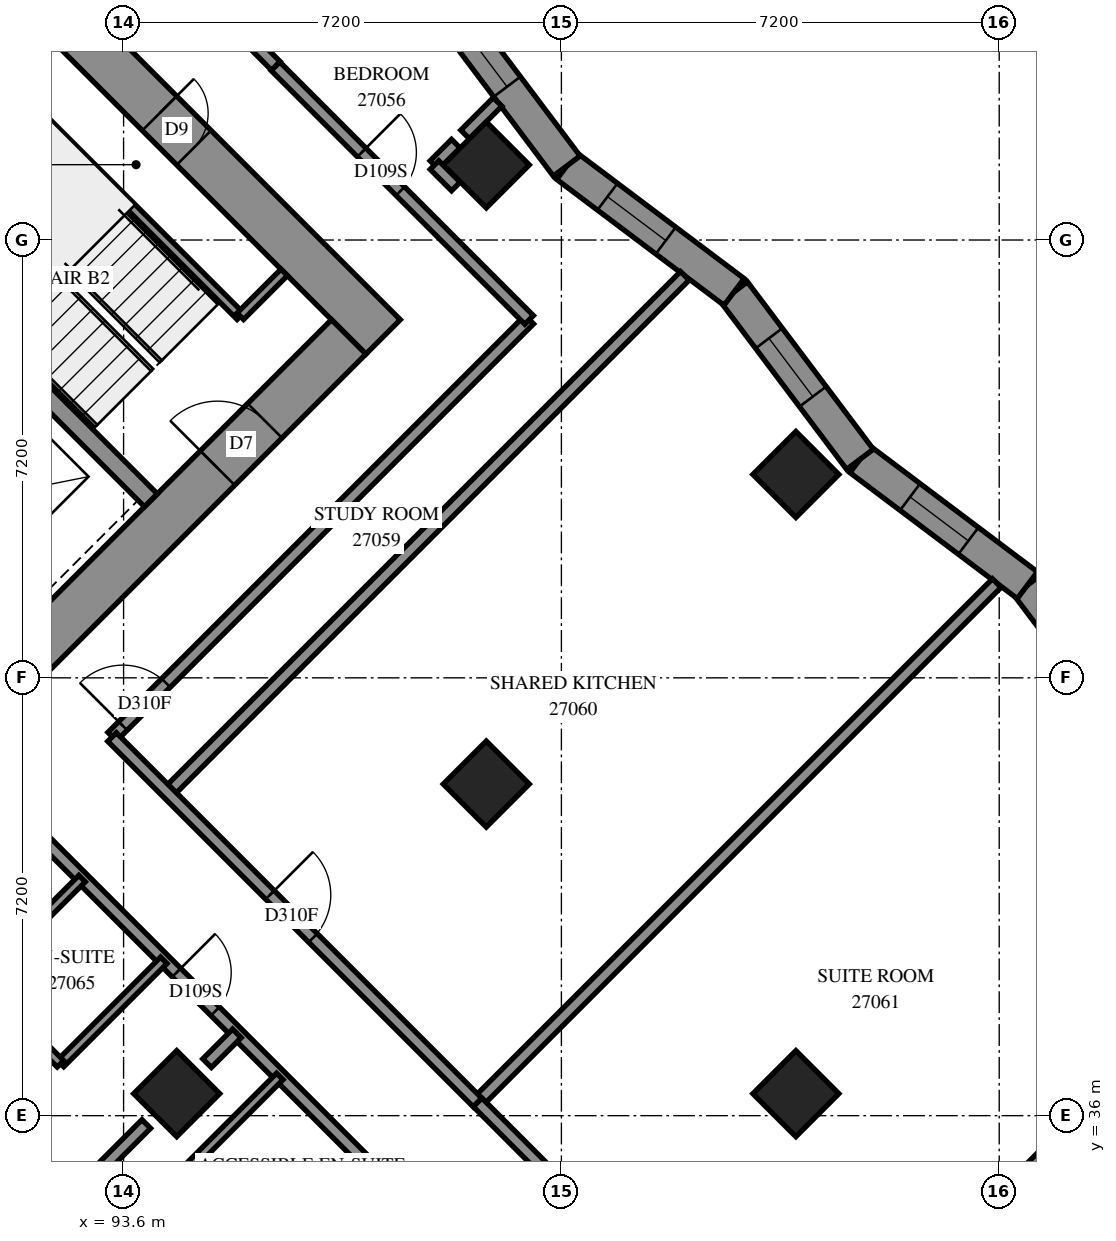
"""IFC4 building model, lengths in metres.
Left out: names, types, materials, properties, quantities, classifications, styles, units other than length and angle.
Written with IfcOpenShell. Run it as: python <this file> out.ifc"""

import sys

from ifc_helpers import new_model, si_unit, direction, frame, frame_2d, origin, origin_2d, place, context, subcontext, project, spatial, polyline, rectangle, outline, extrude, element, fill, save


model = new_model("IFC4")
c1 = context("Model", 3, precision=1e-05, world=origin(), true_north=direction((0.0, 1.0)))
c2 = subcontext(c1, "Body", "Model", "MODEL_VIEW")
j1 = project(units=[si_unit("LENGTHUNIT", "METRE"), si_unit("PLANEANGLEUNIT", "RADIAN")], contexts=[c1])
p1 = place(None, origin())
s1 = spatial("IfcSite", under=j1, at=p1, CompositionType="ELEMENT")
p2 = place(p1, origin())
s2 = spatial("IfcBuilding", under=s1, at=p2, CompositionType="ELEMENT")
p3 = place(p2, frame((0.0, 0.0, 101.6)))
s3 = spatial("IfcBuildingStorey", under=s2, at=p3, CompositionType="ELEMENT", Elevation=101.6)
for number, where, z_axis, x_axis in (
    (1, (99.565, 51.635, 0.0), (0.0, 0.0, 1.0), (0.707, -0.707, 0.0)),
    (2, (104.656, 46.544, 0.0), (0.0, 0.0, 1.0), (0.707, -0.707, 0.0)),
    (3, (99.565, 41.453, 0.0), (0.0, 0.0, 1.0), (0.707, -0.707, 0.0)),
    (4, (94.474, 36.362, 0.0), (0.0, 0.0, 1.0), (0.707, -0.707, 0.0)),
    (5, (104.656, 36.362, 0.0), (0.0, 0.0, 1.0), (0.707, -0.707, 0.0)),
):
    element("IfcColumn", number, at=place(p3, frame(where, z_axis=z_axis, x_axis=x_axis)), inside=s3, PredefinedType="COLUMN", context=c2, shape_type="SweptSolid", body=[
        extrude(rectangle(XDim=1.0, YDim=1.0, at=origin_2d()), origin(), (0.0, 0.0, 1.0), 3.1),
    ])
p4 = place(p3, frame((86.554, 60.121, -0.3), z_axis=(0.0, 0.0, 1.0), x_axis=(0.7071067812, -0.7071067812, 0.0)))
e6 = element("IfcWall", 6, at=p4, inside=s3, PredefinedType="SHEAR", context=c2, shape_type="SweptSolid", body=[
    extrude(rectangle(XDim=16.0, YDim=0.8, at=frame_2d((8.0, 0.0))), origin(), (0.0, 0.0, 1.0), 2.7),
])
p5 = place(p4, frame((10.8, 0.0, 0.3)))
e7 = element("IfcOpeningElement", 7, at=p5, cuts=e6, PredefinedType="OPENING", context=c2, shape_type="SweptSolid", body=[
    extrude(rectangle(XDim=0.8, YDim=2.1, at=frame_2d((0.4, 1.05))), frame((0.0, 0.41, 0.0), z_axis=(0.0, -1.0, 0.0), x_axis=(1.0, 0.0, 0.0)), (0.0, 0.0, 1.0), 0.82),
])
p6 = place(p3, frame((87.12, 38.625, -0.3), z_axis=(0.0, 0.0, 1.0), x_axis=(0.7071067812, 0.7071067812, 0.0)))
e8 = element("IfcWall", 8, at=p6, inside=s3, PredefinedType="SHEAR", context=c2, shape_type="SweptSolid", body=[
    extrude(rectangle(XDim=14.4, YDim=0.8, at=frame_2d((7.2, 0.0))), origin(), (0.0, 0.0, 1.0), 2.7),
])
p7 = place(p6, frame((4.55, 0.0, 0.3)))
e9 = element("IfcOpeningElement", 9, at=p7, cuts=e8, PredefinedType="OPENING", context=c2, shape_type="SweptSolid", body=[
    extrude(rectangle(XDim=1.1, YDim=2.1, at=frame_2d((0.55, 1.05))), frame((0.0, 0.41, 0.0), z_axis=(0.0, -1.0, 0.0), x_axis=(1.0, 0.0, 0.0)), (0.0, 0.0, 1.0), 0.82),
])
p8 = place(p6, frame((11.35, 0.0, 0.3)))
e10 = element("IfcOpeningElement", 10, at=p8, cuts=e8, PredefinedType="OPENING", context=c2, shape_type="SweptSolid", body=[
    extrude(rectangle(XDim=1.1, YDim=2.1, at=frame_2d((0.55, 1.05))), frame((0.0, 0.41, 0.0), z_axis=(0.0, -1.0, 0.0), x_axis=(1.0, 0.0, 0.0)), (0.0, 0.0, 1.0), 0.82),
])
p9 = place(p3, frame((88.958, 51.211, 0.0), z_axis=(0.0, 0.0, 1.0), x_axis=(0.7070998367, -0.7071137256, 0.0)))
e11 = element("IfcWall", 11, at=p9, inside=s3, PredefinedType="SOLIDWALL", context=c2, shape_type="SweptSolid", body=[
    extrude(rectangle(XDim=7.2, YDim=0.3, at=frame_2d((3.6, 0.0))), origin(), (0.0, 0.0, 1.0), 3.1),
])
p10 = place(p3, frame((110.547, 41.952, 0.0), z_axis=(0.0, 0.0, 1.0), x_axis=(-0.6011988974, 0.7990994217, 0.0)))
e12 = element("IfcWall", 12, at=p10, inside=s3, PredefinedType="SOLIDWALL", context=c2, shape_type="SweptSolid", body=[
    extrude(outline(polyline([(0.063, -0.275), (3.507, -0.275), (3.429, 0.275), (-0.063, 0.275), (0.063, -0.275)])), origin(), (0.0, 0.0, 1.0), 3.1),
])
p11 = place(p10, frame((1.115, 0.0, 0.5)))
e13 = element("IfcOpeningElement", 13, at=p11, cuts=e12, PredefinedType="OPENING", context=c2, shape_type="SweptSolid", body=[
    extrude(rectangle(XDim=1.2, YDim=2.45, at=frame_2d((0.6, 1.225))), frame((0.0, 0.285, 0.0), z_axis=(0.0, -1.0, 0.0), x_axis=(1.0, 0.0, 0.0)), (0.0, 0.0, 1.0), 0.57),
])
p12 = place(p3, frame((108.463, 44.723, 0.0), z_axis=(0.0, 0.0, 1.0), x_axis=(-0.7991072191, 0.6011885331, 0.0)))
e14 = element("IfcWall", 14, at=p12, inside=s3, PredefinedType="SOLIDWALL", context=c2, shape_type="SweptSolid", body=[
    extrude(outline(polyline([(-0.039, -0.275), (3.405, -0.275), (3.483, 0.275), (0.039, 0.275), (-0.039, -0.275)])), origin(), (0.0, 0.0, 1.0), 3.1),
])
p13 = place(p12, frame((1.214, 0.0, 0.5)))
e15 = element("IfcOpeningElement", 15, at=p13, cuts=e14, PredefinedType="OPENING", context=c2, shape_type="SweptSolid", body=[
    extrude(rectangle(XDim=1.2, YDim=2.45, at=frame_2d((0.6, 1.225))), frame((0.0, 0.285, 0.0), z_axis=(0.0, -1.0, 0.0), x_axis=(1.0, 0.0, 0.0)), (0.0, 0.0, 1.0), 0.57),
])
p14 = place(p3, frame((105.71, 46.794, 0.0), z_axis=(0.0, 0.0, 1.0), x_axis=(-0.6011839411, 0.7991106738, 0.0)))
e16 = element("IfcWall", 16, at=p14, inside=s3, PredefinedType="SOLIDWALL", context=c2, shape_type="SweptSolid", body=[
    extrude(outline(polyline([(0.039, -0.275), (3.483, -0.275), (3.405, 0.275), (-0.039, 0.275), (0.039, -0.275)])), origin(), (0.0, 0.0, 1.0), 3.1),
])
p15 = place(p14, frame((1.29, 0.0, 0.5)))
e17 = element("IfcOpeningElement", 17, at=p15, cuts=e16, PredefinedType="OPENING", context=c2, shape_type="SweptSolid", body=[
    extrude(rectangle(XDim=1.2, YDim=2.45, at=frame_2d((0.6, 1.225))), frame((0.0, 0.285, 0.0), z_axis=(0.0, -1.0, 0.0), x_axis=(1.0, 0.0, 0.0)), (0.0, 0.0, 1.0), 0.57),
])
p16 = place(p3, frame((103.64, 49.546, 0.0), z_axis=(0.0, 0.0, 1.0), x_axis=(-0.7991072191, 0.6011885331, 0.0)))
e18 = element("IfcWall", 18, at=p16, inside=s3, PredefinedType="SOLIDWALL", context=c2, shape_type="SweptSolid", body=[
    extrude(outline(polyline([(-0.039, -0.275), (3.405, -0.275), (3.483, 0.275), (0.039, 0.275), (-0.039, -0.275)])), origin(), (0.0, 0.0, 1.0), 3.1),
])
p17 = place(p16, frame((1.405, 0.0, 0.5)))
e19 = element("IfcOpeningElement", 19, at=p17, cuts=e18, PredefinedType="OPENING", context=c2, shape_type="SweptSolid", body=[
    extrude(rectangle(XDim=1.2, YDim=2.45, at=frame_2d((0.6, 1.225))), frame((0.0, 0.285, 0.0), z_axis=(0.0, -1.0, 0.0), x_axis=(1.0, 0.0, 0.0)), (0.0, 0.0, 1.0), 0.57),
])
p18 = place(p3, frame((100.887, 51.617, 0.0), z_axis=(0.0, 0.0, 1.0), x_axis=(-0.6011839411, 0.7991106738, 0.0)))
e20 = element("IfcWall", 20, at=p18, inside=s3, PredefinedType="SOLIDWALL", context=c2, shape_type="SweptSolid", body=[
    extrude(outline(polyline([(0.039, -0.275), (3.483, -0.275), (3.405, 0.275), (-0.039, 0.275), (0.039, -0.275)])), origin(), (0.0, 0.0, 1.0), 3.1),
])
p19 = place(p18, frame((1.631, 0.0, 0.5)))
e21 = element("IfcOpeningElement", 21, at=p19, cuts=e20, PredefinedType="OPENING", context=c2, shape_type="SweptSolid", body=[
    extrude(rectangle(XDim=1.2, YDim=2.45, at=frame_2d((0.6, 1.225))), frame((0.0, 0.285, 0.0), z_axis=(0.0, -1.0, 0.0), x_axis=(1.0, 0.0, 0.0)), (0.0, 0.0, 1.0), 0.57),
])
p20 = place(p3, frame((91.313, 53.354, 0.0), z_axis=(0.0, 0.0, 1.0), x_axis=(0.7071067812, -0.7071067812, 0.0)))
e22 = element("IfcWall", 22, at=p20, inside=s3, PredefinedType="PARTITIONING", context=c2, shape_type="SweptSolid", body=[
    extrude(rectangle(XDim=5.95, YDim=0.15, at=frame_2d((2.975, 0.0))), origin(), (0.0, 0.0, 1.0), 3.1),
])
p21 = place(p3, frame((95.52, 49.146, 0.0), z_axis=(0.0, 0.0, 1.0), x_axis=(0.7071067812, 0.7071067812, 0.0)))
e23 = element("IfcWall", 23, at=p21, inside=s3, PredefinedType="PARTITIONING", context=c2, shape_type="SweptSolid", body=[
    extrude(rectangle(XDim=1.02, YDim=0.15, at=frame_2d((0.51, 0.0))), origin(), (0.0, 0.0, 1.0), 3.1),
])
p22 = place(p3, frame((92.004, 40.819, 0.0), z_axis=(0.0, 0.0, 1.0), x_axis=(0.7071067812, -0.7071067812, 0.0)))
e24 = element("IfcWall", 24, at=p22, inside=s3, PredefinedType="PARTITIONING", context=c2, shape_type="SweptSolid", body=[
    extrude(rectangle(XDim=19.298, YDim=0.2, at=frame_2d((9.649, 0.0))), origin(), (0.0, 0.0, 1.0), 3.1),
])
p23 = place(p22, frame((3.489, 0.0, 0.0)))
e25 = element("IfcOpeningElement", 25, at=p23, cuts=e24, PredefinedType="OPENING", context=c2, shape_type="SweptSolid", body=[
    extrude(rectangle(XDim=0.9, YDim=2.1, at=frame_2d((0.45, 1.05))), frame((0.0, 0.11, 0.0), z_axis=(0.0, -1.0, 0.0), x_axis=(1.0, 0.0, 0.0)), (0.0, 0.0, 1.0), 0.22),
])
p24 = place(p22, frame((9.319, 0.0, 0.0)))
e26 = element("IfcOpeningElement", 26, at=p24, cuts=e24, PredefinedType="OPENING", context=c2, shape_type="SweptSolid", body=[
    extrude(rectangle(XDim=0.9, YDim=2.1, at=frame_2d((0.45, 1.05))), frame((0.0, 0.11, 0.0), z_axis=(0.0, -1.0, 0.0), x_axis=(1.0, 0.0, 0.0)), (0.0, 0.0, 1.0), 0.22),
])
p25 = place(p22, frame((15.961, 0.0, 0.0)))
e27 = element("IfcOpeningElement", 27, at=p25, cuts=e24, PredefinedType="OPENING", context=c2, shape_type="SweptSolid", body=[
    extrude(rectangle(XDim=0.9, YDim=2.1, at=frame_2d((0.45, 1.05))), frame((0.0, 0.11, 0.0), z_axis=(0.0, -1.0, 0.0), x_axis=(1.0, 0.0, 0.0)), (0.0, 0.0, 1.0), 0.22),
])
p26 = place(p3, frame((99.423, 36.221, 0.0), z_axis=(0.0, 0.0, 1.0), x_axis=(0.7071067812, 0.7071067812, 0.0)))
e28 = element("IfcWall", 28, at=p26, inside=s3, PredefinedType="PARTITIONING", context=c2, shape_type="SweptSolid", body=[
    extrude(rectangle(XDim=12.072, YDim=0.2, at=frame_2d((6.036, 0.0))), origin(), (0.0, 0.0, 1.0), 3.1),
])
p27 = place(p3, frame((94.331, 41.313, 0.0), z_axis=(0.0, 0.0, 1.0), x_axis=(0.7071109413, 0.7071026211, 0.0)))
e29 = element("IfcWall", 29, at=p27, inside=s3, PredefinedType="PARTITIONING", context=c2, shape_type="SweptSolid", body=[
    extrude(rectangle(XDim=12.019, YDim=0.2, at=frame_2d((6.01, 0.0))), origin(), (0.0, 0.0, 1.0), 3.1),
])
p28 = place(p3, frame((93.413, 42.233, 0.0), z_axis=(0.0, 0.0, 1.0), x_axis=(0.7071067812, 0.7071067812, 0.0)))
e30 = element("IfcWall", 30, at=p28, inside=s3, PredefinedType="PARTITIONING", context=c2, shape_type="SweptSolid", body=[
    extrude(rectangle(XDim=9.699, YDim=0.2, at=frame_2d((4.849, 0.0))), origin(), (0.0, 0.0, 1.0), 3.1),
])
p29 = place(p28, frame((0.249, 0.0, 0.0)))
e31 = element("IfcOpeningElement", 31, at=p29, cuts=e30, PredefinedType="OPENING", context=c2, shape_type="SweptSolid", body=[
    extrude(rectangle(XDim=1.0, YDim=2.1, at=frame_2d((0.5, 1.05))), frame((0.0, 0.11, 0.0), z_axis=(0.0, -1.0, 0.0), x_axis=(1.0, 0.0, 0.0)), (0.0, 0.0, 1.0), 0.22),
])
p30 = place(p3, frame((93.411, 42.227, 0.0), z_axis=(0.0, 0.0, 1.0), x_axis=(0.7071067812, -0.7071067812, 0.0)))
e32 = element("IfcWall", 32, at=p30, inside=s3, PredefinedType="PARTITIONING", context=c2, shape_type="SweptSolid", body=[
    extrude(rectangle(XDim=8.499, YDim=0.2, at=frame_2d((4.25, 0.0))), origin(), (0.0, 0.0, 1.0), 3.1),
])
p31 = place(p30, frame((3.672, 0.0, 0.0)))
e33 = element("IfcOpeningElement", 33, at=p31, cuts=e32, PredefinedType="OPENING", context=c2, shape_type="SweptSolid", body=[
    extrude(rectangle(XDim=1.0, YDim=2.1, at=frame_2d((0.5, 1.05))), frame((0.0, 0.11, 0.0), z_axis=(0.0, -1.0, 0.0), x_axis=(1.0, 0.0, 0.0)), (0.0, 0.0, 1.0), 0.22),
])
p32 = place(p3, frame((96.097, 53.258, 0.0), z_axis=(0.0, 0.0, 1.0), x_axis=(0.7071067812, -0.7071067812, 0.0)))
e34 = element("IfcWall", 34, at=p32, inside=s3, PredefinedType="PARTITIONING", context=c2, shape_type="SweptSolid", body=[
    extrude(rectangle(XDim=5.9, YDim=0.2, at=frame_2d((2.95, 0.0))), origin(), (0.0, 0.0, 1.0), 3.1),
])
p33 = place(p32, frame((2.006, 0.0, 0.0)))
e35 = element("IfcOpeningElement", 35, at=p33, cuts=e34, PredefinedType="OPENING", context=c2, shape_type="SweptSolid", body=[
    extrude(rectangle(XDim=0.9, YDim=2.1, at=frame_2d((0.45, 1.05))), frame((0.0, 0.11, 0.0), z_axis=(0.0, -1.0, 0.0), x_axis=(1.0, 0.0, 0.0)), (0.0, 0.0, 1.0), 0.22),
])
p34 = place(p3, frame((89.881, 31.771, 0.0), z_axis=(0.0, 0.0, 1.0), x_axis=(0.7071067812, 0.7071067812, 0.0)))
e36 = element("IfcWall", 36, at=p34, inside=s3, PredefinedType="PARTITIONING", context=c2, shape_type="SweptSolid", body=[
    extrude(rectangle(XDim=5.787, YDim=0.2, at=frame_2d((2.893, 0.0))), origin(), (0.0, 0.0, 1.0), 3.1),
])
p35 = place(p3, frame((103.168, 32.47, 0.0), z_axis=(0.0, 0.0, 1.0), x_axis=(-0.7067858967, 0.7074275201, 0.0)))
e37 = element("IfcWall", 37, at=p35, inside=s3, PredefinedType="PARTITIONING", context=c2, shape_type="SweptSolid", body=[
    extrude(rectangle(XDim=5.299, YDim=0.2, at=frame_2d((2.65, 0.0))), origin(), (0.0, 0.0, 1.0), 3.1),
])
p36 = place(p35, frame((2.043, 0.0, 0.0)))
e38 = element("IfcOpeningElement", 38, at=p36, cuts=e37, PredefinedType="OPENING", context=c2, shape_type="SweptSolid", body=[
    extrude(rectangle(XDim=0.9, YDim=2.1, at=frame_2d((0.45, 1.05))), frame((0.0, 0.11, 0.0), z_axis=(0.0, -1.0, 0.0), x_axis=(1.0, 0.0, 0.0)), (0.0, 0.0, 1.0), 0.22),
])
p37 = place(p3, frame((106.211, 32.827, 0.0), z_axis=(0.0, 0.0, 1.0), x_axis=(0.7071067812, 0.7071067812, 0.0)))
e39 = element("IfcWall", 39, at=p37, inside=s3, PredefinedType="PARTITIONING", context=c2, shape_type="SweptSolid", body=[
    extrude(rectangle(XDim=4.45, YDim=0.2, at=frame_2d((2.225, 0.0))), origin(), (0.0, 0.0, 1.0), 3.1),
])
for number, where, z_axis, x_axis in (
    (40, (92.563, 36.857, 0.0), (0.0, 0.0, 1.0), (0.707, 0.707, 0.0)),
    (41, (91.219, 38.201, 0.0), (0.0, 0.0, 1.0), (0.707, 0.707, 0.0)),
):
    element("IfcWall", number, at=place(p3, frame(where, z_axis=z_axis, x_axis=x_axis)), inside=s3, PredefinedType="PARTITIONING", context=c2, shape_type="SweptSolid", body=[
        extrude(rectangle(XDim=2.401, YDim=0.15, at=frame_2d((1.201, 0.0))), origin(), (0.0, 0.0, 1.0), 3.1),
    ])
p38 = place(p3, frame((94.473, 34.949, 0.0), z_axis=(0.0, 0.0, 1.0), x_axis=(0.7071067812, 0.7071067812, 0.0)))
e42 = element("IfcWall", 42, at=p38, inside=s3, PredefinedType="PARTITIONING", context=c2, shape_type="SweptSolid", body=[
    extrude(rectangle(XDim=2.398, YDim=0.15, at=frame_2d((1.199, 0.0))), origin(), (0.0, 0.0, 1.0), 3.1),
])
p39 = place(p3, frame((91.217, 38.197, 0.0), z_axis=(0.0, 0.0, 1.0), x_axis=(0.7071067812, -0.7071067812, 0.0)))
e43 = element("IfcWall", 43, at=p39, inside=s3, PredefinedType="PARTITIONING", context=c2, shape_type="SweptSolid", body=[
    extrude(rectangle(XDim=1.901, YDim=0.15, at=frame_2d((0.95, 0.0))), origin(), (0.0, 0.0, 1.0), 3.1),
])
p40 = place(p39, frame((0.502, 0.0, 0.0)))
e44 = element("IfcOpeningElement", 44, at=p40, cuts=e43, PredefinedType="OPENING", context=c2, shape_type="SweptSolid", body=[
    extrude(rectangle(XDim=0.8, YDim=2.1, at=frame_2d((0.4, 1.05))), frame((0.0, 0.085, 0.0), z_axis=(0.0, -1.0, 0.0), x_axis=(1.0, 0.0, 0.0)), (0.0, 0.0, 1.0), 0.17),
])
p41 = place(p3, frame((99.216, 52.136, 0.0), z_axis=(0.0, 0.0, 1.0), x_axis=(0.7071067812, 0.7071067812, 0.0)))
e45 = element("IfcWall", 45, at=p41, inside=s3, PredefinedType="PARTITIONING", context=c2, shape_type="SweptSolid", body=[
    extrude(rectangle(XDim=0.756, YDim=0.2, at=frame_2d((0.378, 0.0))), origin(), (0.0, 0.0, 1.0), 3.1),
])
p42 = place(p3, frame((95.609, 53.761, 0.0), z_axis=(0.0, 0.0, 1.0), x_axis=(0.7056768426, -0.7085338339, 0.0)))
e46 = element("IfcWall", 46, at=p42, inside=s3, PredefinedType="PARTITIONING", context=c2, shape_type="SweptSolid", body=[
    extrude(rectangle(XDim=0.7, YDim=0.2, at=frame_2d((0.35, 0.0))), origin(), (0.0, 0.0, 1.0), 3.1),
])
p43 = place(p3, frame((94.973, 36.863, 0.0), z_axis=(0.0, 0.0, 1.0), x_axis=(0.7071067812, 0.7071067812, 0.0)))
e47 = element("IfcWall", 47, at=p43, inside=s3, PredefinedType="PARTITIONING", context=c2, shape_type="SweptSolid", body=[
    extrude(rectangle(XDim=0.693, YDim=0.2, at=frame_2d((0.346, 0.0))), origin(), (0.0, 0.0, 1.0), 3.1),
])
for number, where, z_axis, x_axis in (
    (48, (98.712, 51.632, 0.0), (0.0, 0.0, 1.0), (0.707, 0.707, 0.0)),
    (49, (98.713, 51.633, 0.0), (0.0, 0.0, 1.0), (0.707, -0.707, 0.0)),
):
    element("IfcWall", number, at=place(p3, frame(where, z_axis=z_axis, x_axis=x_axis)), inside=s3, PredefinedType="PARTITIONING", context=c2, shape_type="SweptSolid", body=[
        extrude(rectangle(XDim=0.498, YDim=0.2, at=frame_2d((0.249, 0.0))), origin(), (0.0, 0.0, 1.0), 3.1),
    ])
p44 = place(p13, origin())
e50 = element("IfcWindow", 50, at=p44, inside=s3, PartitioningType="SINGLE_PANEL", PredefinedType="WINDOW", context=c2, shape_type="SweptSolid", body=[
    extrude(rectangle(XDim=1.2, YDim=2.45, at=frame_2d((0.6, 1.225))), frame((0.0, 0.155, 0.0), z_axis=(0.0, -1.0, 0.0), x_axis=(1.0, 0.0, 0.0)), (0.0, 0.0, 1.0), 0.06),
])
fill(e15, e50)
p45 = place(p15, origin())
e51 = element("IfcWindow", 51, at=p45, inside=s3, PartitioningType="SINGLE_PANEL", PredefinedType="WINDOW", context=c2, shape_type="SweptSolid", body=[
    extrude(rectangle(XDim=1.2, YDim=2.45, at=frame_2d((0.6, 1.225))), frame((0.0, 0.155, 0.0), z_axis=(0.0, -1.0, 0.0), x_axis=(1.0, 0.0, 0.0)), (0.0, 0.0, 1.0), 0.06),
])
fill(e17, e51)
p46 = place(p17, origin())
e52 = element("IfcWindow", 52, at=p46, inside=s3, PartitioningType="SINGLE_PANEL", PredefinedType="WINDOW", context=c2, shape_type="SweptSolid", body=[
    extrude(rectangle(XDim=1.2, YDim=2.45, at=frame_2d((0.6, 1.225))), frame((0.0, 0.155, 0.0), z_axis=(0.0, -1.0, 0.0), x_axis=(1.0, 0.0, 0.0)), (0.0, 0.0, 1.0), 0.06),
])
fill(e19, e52)
p47 = place(p19, origin())
e53 = element("IfcWindow", 53, at=p47, inside=s3, PartitioningType="SINGLE_PANEL", PredefinedType="WINDOW", context=c2, shape_type="SweptSolid", body=[
    extrude(rectangle(XDim=1.2, YDim=2.45, at=frame_2d((0.6, 1.225))), frame((0.0, 0.155, 0.0), z_axis=(0.0, -1.0, 0.0), x_axis=(1.0, 0.0, 0.0)), (0.0, 0.0, 1.0), 0.06),
])
fill(e21, e53)
p48 = place(p5, origin())
e54 = element("IfcDoor", 54, at=p48, inside=s3, OperationType="SINGLE_SWING_RIGHT", PredefinedType="DOOR", context=c2, shape_type="SweptSolid", body=[
    extrude(rectangle(XDim=0.8, YDim=2.1, at=frame_2d((0.4, 1.05))), frame((0.0, -0.34, 0.0), z_axis=(0.0, -1.0, 0.0), x_axis=(1.0, 0.0, 0.0)), (0.0, 0.0, 1.0), 0.05),
])
fill(e7, e54)
p49 = place(p8, origin())
e55 = element("IfcDoor", 55, at=p49, inside=s3, OperationType="SINGLE_SWING_RIGHT", PredefinedType="DOOR", context=c2, shape_type="SweptSolid", body=[
    extrude(rectangle(XDim=1.1, YDim=2.1, at=frame_2d((0.55, 1.05))), frame((0.0, 0.025, 0.0), z_axis=(0.0, -1.0, 0.0), x_axis=(1.0, 0.0, 0.0)), (0.0, 0.0, 1.0), 0.05),
])
fill(e10, e55)
p50 = place(p33, origin())
e56 = element("IfcDoor", 56, at=p50, inside=s3, OperationType="SINGLE_SWING_LEFT", PredefinedType="DOOR", context=c2, shape_type="SweptSolid", body=[
    extrude(rectangle(XDim=0.9, YDim=2.1, at=frame_2d((0.45, 1.05))), frame((0.0, 0.025, 0.0), z_axis=(0.0, -1.0, 0.0), x_axis=(1.0, 0.0, 0.0)), (0.0, 0.0, 1.0), 0.05),
])
fill(e35, e56)
p51 = place(p29, origin())
e57 = element("IfcDoor", 57, at=p51, inside=s3, OperationType="SINGLE_SWING_LEFT", PredefinedType="DOOR", context=c2, shape_type="SweptSolid", body=[
    extrude(rectangle(XDim=1.0, YDim=2.1, at=frame_2d((0.5, 1.05))), frame((0.0, 0.025, 0.0), z_axis=(0.0, -1.0, 0.0), x_axis=(1.0, 0.0, 0.0)), (0.0, 0.0, 1.0), 0.05),
])
fill(e31, e57)
p52 = place(p31, origin())
e58 = element("IfcDoor", 58, at=p52, inside=s3, OperationType="SINGLE_SWING_RIGHT", PredefinedType="DOOR", context=c2, shape_type="SweptSolid", body=[
    extrude(rectangle(XDim=1.0, YDim=2.1, at=frame_2d((0.5, 1.05))), frame((0.0, 0.025, 0.0), z_axis=(0.0, -1.0, 0.0), x_axis=(1.0, 0.0, 0.0)), (0.0, 0.0, 1.0), 0.05),
])
fill(e33, e58)
p53 = place(p23, origin())
e59 = element("IfcDoor", 59, at=p53, inside=s3, OperationType="SINGLE_SWING_LEFT", PredefinedType="DOOR", context=c2, shape_type="SweptSolid", body=[
    extrude(rectangle(XDim=0.9, YDim=2.1, at=frame_2d((0.45, 1.05))), frame((0.0, 0.025, 0.0), z_axis=(0.0, -1.0, 0.0), x_axis=(1.0, 0.0, 0.0)), (0.0, 0.0, 1.0), 0.05),
])
fill(e25, e59)
save(model, sys.argv[1])
